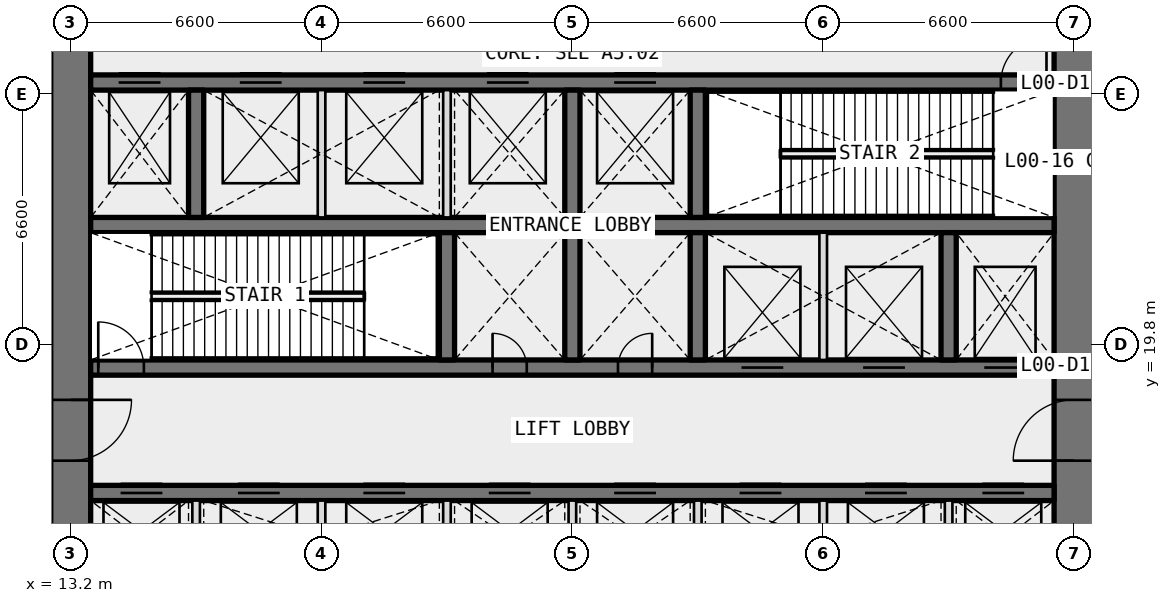
"""IFC4 building model, lengths in metres.
Left out: names, types, materials, properties, quantities, classifications, styles, units other than length and angle.
Written with IfcOpenShell. Run it as: python <this file> out.ifc"""

import sys

from ifc_helpers import new_model, si_unit, direction, frame, frame_2d, origin, place, context, subcontext, project, spatial, rectangle, extrude, element, fill, save


model = new_model("IFC4")
c1 = context("Model", 3, precision=1e-05, world=origin(), true_north=direction((0.0, 1.0)))
c2 = subcontext(c1, "Body", "Model", "MODEL_VIEW")
j1 = project(units=[si_unit("LENGTHUNIT", "METRE"), si_unit("PLANEANGLEUNIT", "RADIAN")], contexts=[c1])
p1 = place(None, origin())
s1 = spatial("IfcSite", under=j1, at=p1, CompositionType="ELEMENT")
p2 = place(p1, origin())
s2 = spatial("IfcBuilding", under=s1, at=p2, CompositionType="ELEMENT")
p3 = place(p2, origin())
s3 = spatial("IfcBuildingStorey", under=s2, at=p3, CompositionType="ELEMENT", Elevation=0.0)
p4 = place(p3, frame((39.6, 13.725, 0.0), z_axis=(0.0, 0.0, 1.0), x_axis=(0.0, 1.0, 0.0)))
e1 = element("IfcWall", 1, at=p4, inside=s3, PredefinedType="SHEAR", context=c2, shape_type="SweptSolid", body=[
    extrude(rectangle(XDim=18.75, YDim=1.05, at=frame_2d((9.375, 0.0))), origin(), (0.0, 0.0, 1.0), 7.2),
])
p5 = place(p4, frame((3.025, 0.0, 0.0)))
e2 = element("IfcOpeningElement", 2, at=p5, cuts=e1, PredefinedType="OPENING", context=c2, shape_type="SweptSolid", body=[
    extrude(rectangle(XDim=1.6, YDim=2.1, at=frame_2d((0.8, 1.05))), frame((0.0, 0.535, 0.0), z_axis=(0.0, -1.0, 0.0), x_axis=(1.0, 0.0, 0.0)), (0.0, 0.0, 1.0), 1.07),
])
p6 = place(p4, frame((13.825, 0.0, 0.0)))
e3 = element("IfcOpeningElement", 3, at=p6, cuts=e1, PredefinedType="OPENING", context=c2, shape_type="SweptSolid", body=[
    extrude(rectangle(XDim=1.6, YDim=2.1, at=frame_2d((0.8, 1.05))), frame((0.0, 0.535, 0.0), z_axis=(0.0, -1.0, 0.0), x_axis=(1.0, 0.0, 0.0)), (0.0, 0.0, 1.0), 1.07),
])
p7 = place(p3, frame((13.2, 32.475, 0.0), z_axis=(0.0, 0.0, 1.0), x_axis=(0.0, -1.0, 0.0)))
e4 = element("IfcWall", 4, at=p7, inside=s3, PredefinedType="SHEAR", context=c2, shape_type="SweptSolid", body=[
    extrude(rectangle(XDim=18.75, YDim=1.05, at=frame_2d((9.375, 0.0))), origin(), (0.0, 0.0, 1.0), 7.2),
])
p8 = place(p7, frame((14.125, 0.0, 0.0)))
e5 = element("IfcOpeningElement", 5, at=p8, cuts=e4, PredefinedType="OPENING", context=c2, shape_type="SweptSolid", body=[
    extrude(rectangle(XDim=1.6, YDim=2.1, at=frame_2d((0.8, 1.05))), frame((0.0, 0.535, 0.0), z_axis=(0.0, -1.0, 0.0), x_axis=(1.0, 0.0, 0.0)), (0.0, 0.0, 1.0), 1.07),
])
p9 = place(p7, frame((3.325, 0.0, 0.0)))
e6 = element("IfcOpeningElement", 6, at=p9, cuts=e4, PredefinedType="OPENING", context=c2, shape_type="SweptSolid", body=[
    extrude(rectangle(XDim=1.6, YDim=2.1, at=frame_2d((0.8, 1.05))), frame((0.0, 0.535, 0.0), z_axis=(0.0, -1.0, 0.0), x_axis=(1.0, 0.0, 0.0)), (0.0, 0.0, 1.0), 1.07),
])
p10 = place(p3, frame((13.725, 15.9, 0.0), z_axis=(0.0, 0.0, 1.0), x_axis=(1.0, 0.0, 0.0)))
e7 = element("IfcWall", 7, at=p10, inside=s3, PredefinedType="SHEAR", context=c2, shape_type="SweptSolid", body=[
    extrude(rectangle(XDim=25.35, YDim=0.4, at=frame_2d((12.675, 0.0))), origin(), (0.0, 0.0, 1.0), 7.2),
])
p11 = place(p10, frame((0.788, 0.0, 0.0)))
e8 = element("IfcOpeningElement", 8, at=p11, cuts=e7, PredefinedType="OPENING", context=c2, shape_type="SweptSolid", body=[
    extrude(rectangle(XDim=1.1, YDim=2.1, at=frame_2d((0.55, 1.05))), frame((0.0, 0.21, 0.0), z_axis=(0.0, -1.0, 0.0), x_axis=(1.0, 0.0, 0.0)), (0.0, 0.0, 1.0), 0.42),
])
p12 = place(p10, frame((3.875, 0.0, 0.0)))
e9 = element("IfcOpeningElement", 9, at=p12, cuts=e7, PredefinedType="OPENING", context=c2, shape_type="SweptSolid", body=[
    extrude(rectangle(XDim=1.1, YDim=2.1, at=frame_2d((0.55, 1.05))), frame((0.0, 0.21, 0.0), z_axis=(0.0, -1.0, 0.0), x_axis=(1.0, 0.0, 0.0)), (0.0, 0.0, 1.0), 0.42),
])
p13 = place(p10, frame((7.175, 0.0, 0.0)))
e10 = element("IfcOpeningElement", 10, at=p13, cuts=e7, PredefinedType="OPENING", context=c2, shape_type="SweptSolid", body=[
    extrude(rectangle(XDim=1.1, YDim=2.1, at=frame_2d((0.55, 1.05))), frame((0.0, 0.21, 0.0), z_axis=(0.0, -1.0, 0.0), x_axis=(1.0, 0.0, 0.0)), (0.0, 0.0, 1.0), 0.42),
])
p14 = place(p10, frame((10.475, 0.0, 0.0)))
e11 = element("IfcOpeningElement", 11, at=p14, cuts=e7, PredefinedType="OPENING", context=c2, shape_type="SweptSolid", body=[
    extrude(rectangle(XDim=1.1, YDim=2.1, at=frame_2d((0.55, 1.05))), frame((0.0, 0.21, 0.0), z_axis=(0.0, -1.0, 0.0), x_axis=(1.0, 0.0, 0.0)), (0.0, 0.0, 1.0), 0.42),
])
p15 = place(p10, frame((13.775, 0.0, 0.0)))
e12 = element("IfcOpeningElement", 12, at=p15, cuts=e7, PredefinedType="OPENING", context=c2, shape_type="SweptSolid", body=[
    extrude(rectangle(XDim=1.1, YDim=2.1, at=frame_2d((0.55, 1.05))), frame((0.0, 0.21, 0.0), z_axis=(0.0, -1.0, 0.0), x_axis=(1.0, 0.0, 0.0)), (0.0, 0.0, 1.0), 0.42),
])
p16 = place(p10, frame((17.075, 0.0, 0.0)))
e13 = element("IfcOpeningElement", 13, at=p16, cuts=e7, PredefinedType="OPENING", context=c2, shape_type="SweptSolid", body=[
    extrude(rectangle(XDim=1.1, YDim=2.1, at=frame_2d((0.55, 1.05))), frame((0.0, 0.21, 0.0), z_axis=(0.0, -1.0, 0.0), x_axis=(1.0, 0.0, 0.0)), (0.0, 0.0, 1.0), 0.42),
])
p17 = place(p10, frame((20.375, 0.0, 0.0)))
e14 = element("IfcOpeningElement", 14, at=p17, cuts=e7, PredefinedType="OPENING", context=c2, shape_type="SweptSolid", body=[
    extrude(rectangle(XDim=1.1, YDim=2.1, at=frame_2d((0.55, 1.05))), frame((0.0, 0.21, 0.0), z_axis=(0.0, -1.0, 0.0), x_axis=(1.0, 0.0, 0.0)), (0.0, 0.0, 1.0), 0.42),
])
p18 = place(p10, frame((23.462, 0.0, 0.0)))
e15 = element("IfcOpeningElement", 15, at=p18, cuts=e7, PredefinedType="OPENING", context=c2, shape_type="SweptSolid", body=[
    extrude(rectangle(XDim=1.1, YDim=2.1, at=frame_2d((0.55, 1.05))), frame((0.0, 0.21, 0.0), z_axis=(0.0, -1.0, 0.0), x_axis=(1.0, 0.0, 0.0)), (0.0, 0.0, 1.0), 0.42),
])
p19 = place(p3, frame((13.725, 19.2, 0.0), z_axis=(0.0, 0.0, 1.0), x_axis=(1.0, 0.0, 0.0)))
e16 = element("IfcWall", 16, at=p19, inside=s3, PredefinedType="SHEAR", context=c2, shape_type="SweptSolid", body=[
    extrude(rectangle(XDim=25.35, YDim=0.4, at=frame_2d((12.675, 0.0))), origin(), (0.0, 0.0, 1.0), 7.2),
])
p20 = place(p19, frame((10.575, 0.0, 0.0)))
e17 = element("IfcOpeningElement", 17, at=p20, cuts=e16, PredefinedType="OPENING", context=c2, shape_type="SweptSolid", body=[
    extrude(rectangle(XDim=0.9, YDim=2.1, at=frame_2d((0.45, 1.05))), frame((0.0, 0.21, 0.0), z_axis=(0.0, -1.0, 0.0), x_axis=(1.0, 0.0, 0.0)), (0.0, 0.0, 1.0), 0.42),
])
p21 = place(p19, frame((13.875, 0.0, 0.0)))
e18 = element("IfcOpeningElement", 18, at=p21, cuts=e16, PredefinedType="OPENING", context=c2, shape_type="SweptSolid", body=[
    extrude(rectangle(XDim=0.9, YDim=2.1, at=frame_2d((0.45, 1.05))), frame((0.0, 0.21, 0.0), z_axis=(0.0, -1.0, 0.0), x_axis=(1.0, 0.0, 0.0)), (0.0, 0.0, 1.0), 0.42),
])
p22 = place(p19, frame((0.2, 0.0, 0.0)))
e19 = element("IfcOpeningElement", 19, at=p22, cuts=e16, PredefinedType="OPENING", context=c2, shape_type="SweptSolid", body=[
    extrude(rectangle(XDim=1.2, YDim=2.1, at=frame_2d((0.6, 1.05))), frame((0.0, 0.21, 0.0), z_axis=(0.0, -1.0, 0.0), x_axis=(1.0, 0.0, 0.0)), (0.0, 0.0, 1.0), 0.42),
])
p23 = place(p19, frame((23.512, 0.0, 0.0)))
e20 = element("IfcOpeningElement", 20, at=p23, cuts=e16, PredefinedType="OPENING", context=c2, shape_type="SweptSolid", body=[
    extrude(rectangle(XDim=1.1, YDim=2.1, at=frame_2d((0.55, 1.05))), frame((0.0, 0.21, 0.0), z_axis=(0.0, -1.0, 0.0), x_axis=(1.0, 0.0, 0.0)), (0.0, 0.0, 1.0), 0.42),
])
p24 = place(p19, frame((17.125, 0.0, 0.0)))
e21 = element("IfcOpeningElement", 21, at=p24, cuts=e16, PredefinedType="OPENING", context=c2, shape_type="SweptSolid", body=[
    extrude(rectangle(XDim=1.1, YDim=2.1, at=frame_2d((0.55, 1.05))), frame((0.0, 0.21, 0.0), z_axis=(0.0, -1.0, 0.0), x_axis=(1.0, 0.0, 0.0)), (0.0, 0.0, 1.0), 0.42),
])
p25 = place(p19, frame((20.325, 0.0, 0.0)))
e22 = element("IfcOpeningElement", 22, at=p25, cuts=e16, PredefinedType="OPENING", context=c2, shape_type="SweptSolid", body=[
    extrude(rectangle(XDim=1.1, YDim=2.1, at=frame_2d((0.55, 1.05))), frame((0.0, 0.21, 0.0), z_axis=(0.0, -1.0, 0.0), x_axis=(1.0, 0.0, 0.0)), (0.0, 0.0, 1.0), 0.42),
])
p26 = place(p3, frame((13.725, 22.95, 0.0), z_axis=(0.0, 0.0, 1.0), x_axis=(1.0, 0.0, 0.0)))
e23 = element("IfcWall", 23, at=p26, inside=s3, PredefinedType="SHEAR", context=c2, shape_type="SweptSolid", body=[
    extrude(rectangle(XDim=25.35, YDim=0.4, at=frame_2d((12.675, 0.0))), origin(), (0.0, 0.0, 1.0), 7.2),
])
p27 = place(p3, frame((13.725, 26.7, 0.0), z_axis=(0.0, 0.0, 1.0), x_axis=(1.0, 0.0, 0.0)))
e24 = element("IfcWall", 24, at=p27, inside=s3, PredefinedType="SHEAR", context=c2, shape_type="SweptSolid", body=[
    extrude(rectangle(XDim=25.35, YDim=0.4, at=frame_2d((12.675, 0.0))), origin(), (0.0, 0.0, 1.0), 7.2),
])
p28 = place(p27, frame((23.95, 0.0, 0.0)))
e25 = element("IfcOpeningElement", 25, at=p28, cuts=e24, PredefinedType="OPENING", context=c2, shape_type="SweptSolid", body=[
    extrude(rectangle(XDim=1.2, YDim=2.1, at=frame_2d((0.6, 1.05))), frame((0.0, 0.21, 0.0), z_axis=(0.0, -1.0, 0.0), x_axis=(1.0, 0.0, 0.0)), (0.0, 0.0, 1.0), 0.42),
])
p29 = place(p27, frame((0.738, 0.0, 0.0)))
e26 = element("IfcOpeningElement", 26, at=p29, cuts=e24, PredefinedType="OPENING", context=c2, shape_type="SweptSolid", body=[
    extrude(rectangle(XDim=1.1, YDim=2.1, at=frame_2d((0.55, 1.05))), frame((0.0, 0.21, 0.0), z_axis=(0.0, -1.0, 0.0), x_axis=(1.0, 0.0, 0.0)), (0.0, 0.0, 1.0), 0.42),
])
p30 = place(p27, frame((3.925, 0.0, 0.0)))
e27 = element("IfcOpeningElement", 27, at=p30, cuts=e24, PredefinedType="OPENING", context=c2, shape_type="SweptSolid", body=[
    extrude(rectangle(XDim=1.1, YDim=2.1, at=frame_2d((0.55, 1.05))), frame((0.0, 0.21, 0.0), z_axis=(0.0, -1.0, 0.0), x_axis=(1.0, 0.0, 0.0)), (0.0, 0.0, 1.0), 0.42),
])
p31 = place(p27, frame((7.175, 0.0, 0.0)))
e28 = element("IfcOpeningElement", 28, at=p31, cuts=e24, PredefinedType="OPENING", context=c2, shape_type="SweptSolid", body=[
    extrude(rectangle(XDim=1.1, YDim=2.1, at=frame_2d((0.55, 1.05))), frame((0.0, 0.21, 0.0), z_axis=(0.0, -1.0, 0.0), x_axis=(1.0, 0.0, 0.0)), (0.0, 0.0, 1.0), 0.42),
])
p32 = place(p27, frame((10.425, 0.0, 0.0)))
e29 = element("IfcOpeningElement", 29, at=p32, cuts=e24, PredefinedType="OPENING", context=c2, shape_type="SweptSolid", body=[
    extrude(rectangle(XDim=1.1, YDim=2.1, at=frame_2d((0.55, 1.05))), frame((0.0, 0.21, 0.0), z_axis=(0.0, -1.0, 0.0), x_axis=(1.0, 0.0, 0.0)), (0.0, 0.0, 1.0), 0.42),
])
p33 = place(p27, frame((13.775, 0.0, 0.0)))
e30 = element("IfcOpeningElement", 30, at=p33, cuts=e24, PredefinedType="OPENING", context=c2, shape_type="SweptSolid", body=[
    extrude(rectangle(XDim=1.1, YDim=2.1, at=frame_2d((0.55, 1.05))), frame((0.0, 0.21, 0.0), z_axis=(0.0, -1.0, 0.0), x_axis=(1.0, 0.0, 0.0)), (0.0, 0.0, 1.0), 0.42),
])
for number, where, z_axis, x_axis in (
    (31, (23.1, 19.4, 0.0), (0.0, 0.0, 1.0), (0.0, 1.0, 0.0)),
    (32, (26.4, 19.4, 0.0), (0.0, 0.0, 1.0), (0.0, 1.0, 0.0)),
    (33, (29.7, 19.4, 0.0), (0.0, 0.0, 1.0), (0.0, 1.0, 0.0)),
    (34, (36.3, 19.4, 0.0), (0.0, 0.0, 1.0), (0.0, 1.0, 0.0)),
    (35, (16.5, 23.15, 0.0), (0.0, 0.0, 1.0), (0.0, 1.0, 0.0)),
    (36, (26.4, 23.15, 0.0), (0.0, 0.0, 1.0), (0.0, 1.0, 0.0)),
    (37, (29.7, 23.15, 0.0), (0.0, 0.0, 1.0), (0.0, 1.0, 0.0)),
):
    element("IfcWall", number, at=place(p3, frame(where, z_axis=z_axis, x_axis=x_axis)), inside=s3, PredefinedType="SHEAR", context=c2, shape_type="SweptSolid", body=[
        extrude(rectangle(XDim=3.35, YDim=0.4, at=frame_2d((1.675, 0.0))), origin(), (0.0, 0.0, 1.0), 7.2),
    ])
for number, where, z_axis, x_axis in (
    (38, (16.5, 13.725, 0.0), (0.0, 0.0, 1.0), (0.0, 1.0, 0.0)),
    (39, (19.8, 13.725, 0.0), (0.0, 0.0, 1.0), (0.0, 1.0, 0.0)),
    (40, (23.1, 13.725, 0.0), (0.0, 0.0, 1.0), (0.0, 1.0, 0.0)),
    (41, (26.4, 13.725, 0.0), (0.0, 0.0, 1.0), (0.0, 1.0, 0.0)),
    (42, (29.7, 13.725, 0.0), (0.0, 0.0, 1.0), (0.0, 1.0, 0.0)),
    (43, (33.0, 13.725, 0.0), (0.0, 0.0, 1.0), (0.0, 1.0, 0.0)),
    (44, (36.3, 13.725, 0.0), (0.0, 0.0, 1.0), (0.0, 1.0, 0.0)),
):
    element("IfcWall", number, at=place(p3, frame(where, z_axis=z_axis, x_axis=x_axis)), inside=s3, PredefinedType="PARTITIONING", context=c2, shape_type="SweptSolid", body=[
        extrude(rectangle(XDim=1.975, YDim=0.2, at=frame_2d((0.987, 0.0))), origin(), (0.0, 0.0, 1.0), 7.2),
    ])
for number, where, z_axis, x_axis in (
    (45, (33.0, 19.4, 0.0), (0.0, 0.0, 1.0), (0.0, 1.0, 0.0)),
    (46, (19.8, 23.15, 0.0), (0.0, 0.0, 1.0), (0.0, 1.0, 0.0)),
    (47, (23.1, 23.15, 0.0), (0.0, 0.0, 1.0), (0.0, 1.0, 0.0)),
):
    element("IfcWall", number, at=place(p3, frame(where, z_axis=z_axis, x_axis=x_axis)), inside=s3, PredefinedType="PARTITIONING", context=c2, shape_type="SweptSolid", body=[
        extrude(rectangle(XDim=3.35, YDim=0.2, at=frame_2d((1.675, 0.0))), origin(), (0.0, 0.0, 1.0), 7.2),
    ])
p34 = place(p20, origin())
e48 = element("IfcDoor", 48, at=p34, inside=s3, OperationType="SINGLE_SWING_LEFT", PredefinedType="DOOR", context=c2, shape_type="SweptSolid", body=[
    extrude(rectangle(XDim=0.9, YDim=2.1, at=frame_2d((0.45, 1.05))), frame((0.0, 0.025, 0.0), z_axis=(0.0, -1.0, 0.0), x_axis=(1.0, 0.0, 0.0)), (0.0, 0.0, 1.0), 0.05),
])
fill(e17, e48)
p35 = place(p21, origin())
e49 = element("IfcDoor", 49, at=p35, inside=s3, OperationType="SINGLE_SWING_RIGHT", PredefinedType="DOOR", context=c2, shape_type="SweptSolid", body=[
    extrude(rectangle(XDim=0.9, YDim=2.1, at=frame_2d((0.45, 1.05))), frame((0.0, 0.025, 0.0), z_axis=(0.0, -1.0, 0.0), x_axis=(1.0, 0.0, 0.0)), (0.0, 0.0, 1.0), 0.05),
])
fill(e18, e49)
p36 = place(p22, origin())
e50 = element("IfcDoor", 50, at=p36, inside=s3, OperationType="SINGLE_SWING_LEFT", PredefinedType="DOOR", context=c2, shape_type="SweptSolid", body=[
    extrude(rectangle(XDim=1.2, YDim=2.1, at=frame_2d((0.6, 1.05))), frame((0.0, 0.025, 0.0), z_axis=(0.0, -1.0, 0.0), x_axis=(1.0, 0.0, 0.0)), (0.0, 0.0, 1.0), 0.05),
])
fill(e19, e50)
p37 = place(p28, origin())
e51 = element("IfcDoor", 51, at=p37, inside=s3, OperationType="SINGLE_SWING_RIGHT", PredefinedType="DOOR", context=c2, shape_type="SweptSolid", body=[
    extrude(rectangle(XDim=1.2, YDim=2.1, at=frame_2d((0.6, 1.05))), frame((0.0, 0.025, 0.0), z_axis=(0.0, -1.0, 0.0), x_axis=(1.0, 0.0, 0.0)), (0.0, 0.0, 1.0), 0.05),
])
fill(e25, e51)
p38 = place(p8, origin())
e52 = element("IfcDoor", 52, at=p38, inside=s3, OperationType="DOUBLE_DOOR_DOUBLE_SWING", PredefinedType="DOOR", context=c2, shape_type="SweptSolid", body=[
    extrude(rectangle(XDim=1.6, YDim=2.1, at=frame_2d((0.8, 1.05))), frame((0.0, 0.025, 0.0), z_axis=(0.0, -1.0, 0.0), x_axis=(1.0, 0.0, 0.0)), (0.0, 0.0, 1.0), 0.05),
])
fill(e5, e52)
p39 = place(p5, origin())
e53 = element("IfcDoor", 53, at=p39, inside=s3, OperationType="DOUBLE_DOOR_DOUBLE_SWING", PredefinedType="DOOR", context=c2, shape_type="SweptSolid", body=[
    extrude(rectangle(XDim=1.6, YDim=2.1, at=frame_2d((0.8, 1.05))), frame((0.0, 0.025, 0.0), z_axis=(0.0, -1.0, 0.0), x_axis=(1.0, 0.0, 0.0)), (0.0, 0.0, 1.0), 0.05),
])
fill(e2, e53)
p40 = place(p11, origin())
e54 = element("IfcDoor", 54, at=p40, inside=s3, OperationType="DOUBLE_DOOR_SLIDING", PredefinedType="DOOR", context=c2, shape_type="SweptSolid", body=[
    extrude(rectangle(XDim=1.1, YDim=2.1, at=frame_2d((0.55, 1.05))), frame((0.0, 0.025, 0.0), z_axis=(0.0, -1.0, 0.0), x_axis=(1.0, 0.0, 0.0)), (0.0, 0.0, 1.0), 0.05),
])
fill(e8, e54)
p41 = place(p12, origin())
e55 = element("IfcDoor", 55, at=p41, inside=s3, OperationType="DOUBLE_DOOR_SLIDING", PredefinedType="DOOR", context=c2, shape_type="SweptSolid", body=[
    extrude(rectangle(XDim=1.1, YDim=2.1, at=frame_2d((0.55, 1.05))), frame((0.0, 0.025, 0.0), z_axis=(0.0, -1.0, 0.0), x_axis=(1.0, 0.0, 0.0)), (0.0, 0.0, 1.0), 0.05),
])
fill(e9, e55)
p42 = place(p13, origin())
e56 = element("IfcDoor", 56, at=p42, inside=s3, OperationType="DOUBLE_DOOR_SLIDING", PredefinedType="DOOR", context=c2, shape_type="SweptSolid", body=[
    extrude(rectangle(XDim=1.1, YDim=2.1, at=frame_2d((0.55, 1.05))), frame((0.0, 0.025, 0.0), z_axis=(0.0, -1.0, 0.0), x_axis=(1.0, 0.0, 0.0)), (0.0, 0.0, 1.0), 0.05),
])
fill(e10, e56)
p43 = place(p14, origin())
e57 = element("IfcDoor", 57, at=p43, inside=s3, OperationType="DOUBLE_DOOR_SLIDING", PredefinedType="DOOR", context=c2, shape_type="SweptSolid", body=[
    extrude(rectangle(XDim=1.1, YDim=2.1, at=frame_2d((0.55, 1.05))), frame((0.0, 0.025, 0.0), z_axis=(0.0, -1.0, 0.0), x_axis=(1.0, 0.0, 0.0)), (0.0, 0.0, 1.0), 0.05),
])
fill(e11, e57)
p44 = place(p15, origin())
e58 = element("IfcDoor", 58, at=p44, inside=s3, OperationType="DOUBLE_DOOR_SLIDING", PredefinedType="DOOR", context=c2, shape_type="SweptSolid", body=[
    extrude(rectangle(XDim=1.1, YDim=2.1, at=frame_2d((0.55, 1.05))), frame((0.0, 0.025, 0.0), z_axis=(0.0, -1.0, 0.0), x_axis=(1.0, 0.0, 0.0)), (0.0, 0.0, 1.0), 0.05),
])
fill(e12, e58)
p45 = place(p16, origin())
e59 = element("IfcDoor", 59, at=p45, inside=s3, OperationType="DOUBLE_DOOR_SLIDING", PredefinedType="DOOR", context=c2, shape_type="SweptSolid", body=[
    extrude(rectangle(XDim=1.1, YDim=2.1, at=frame_2d((0.55, 1.05))), frame((0.0, 0.025, 0.0), z_axis=(0.0, -1.0, 0.0), x_axis=(1.0, 0.0, 0.0)), (0.0, 0.0, 1.0), 0.05),
])
fill(e13, e59)
p46 = place(p17, origin())
e60 = element("IfcDoor", 60, at=p46, inside=s3, OperationType="DOUBLE_DOOR_SLIDING", PredefinedType="DOOR", context=c2, shape_type="SweptSolid", body=[
    extrude(rectangle(XDim=1.1, YDim=2.1, at=frame_2d((0.55, 1.05))), frame((0.0, 0.025, 0.0), z_axis=(0.0, -1.0, 0.0), x_axis=(1.0, 0.0, 0.0)), (0.0, 0.0, 1.0), 0.05),
])
fill(e14, e60)
p47 = place(p18, origin())
e61 = element("IfcDoor", 61, at=p47, inside=s3, OperationType="DOUBLE_DOOR_SLIDING", PredefinedType="DOOR", context=c2, shape_type="SweptSolid", body=[
    extrude(rectangle(XDim=1.1, YDim=2.1, at=frame_2d((0.55, 1.05))), frame((0.0, 0.025, 0.0), z_axis=(0.0, -1.0, 0.0), x_axis=(1.0, 0.0, 0.0)), (0.0, 0.0, 1.0), 0.05),
])
fill(e15, e61)
p48 = place(p29, origin())
e62 = element("IfcDoor", 62, at=p48, inside=s3, OperationType="DOUBLE_DOOR_SLIDING", PredefinedType="DOOR", context=c2, shape_type="SweptSolid", body=[
    extrude(rectangle(XDim=1.1, YDim=2.1, at=frame_2d((0.55, 1.05))), frame((0.0, 0.025, 0.0), z_axis=(0.0, -1.0, 0.0), x_axis=(1.0, 0.0, 0.0)), (0.0, 0.0, 1.0), 0.05),
])
fill(e26, e62)
p49 = place(p23, origin())
e63 = element("IfcDoor", 63, at=p49, inside=s3, OperationType="DOUBLE_DOOR_SLIDING", PredefinedType="DOOR", context=c2, shape_type="SweptSolid", body=[
    extrude(rectangle(XDim=1.1, YDim=2.1, at=frame_2d((0.55, 1.05))), frame((0.0, 0.025, 0.0), z_axis=(0.0, -1.0, 0.0), x_axis=(1.0, 0.0, 0.0)), (0.0, 0.0, 1.0), 0.05),
])
fill(e20, e63)
p50 = place(p24, origin())
e64 = element("IfcDoor", 64, at=p50, inside=s3, OperationType="DOUBLE_DOOR_SLIDING", PredefinedType="DOOR", context=c2, shape_type="SweptSolid", body=[
    extrude(rectangle(XDim=1.1, YDim=2.1, at=frame_2d((0.55, 1.05))), frame((0.0, 0.025, 0.0), z_axis=(0.0, -1.0, 0.0), x_axis=(1.0, 0.0, 0.0)), (0.0, 0.0, 1.0), 0.05),
])
fill(e21, e64)
p51 = place(p25, origin())
e65 = element("IfcDoor", 65, at=p51, inside=s3, OperationType="DOUBLE_DOOR_SLIDING", PredefinedType="DOOR", context=c2, shape_type="SweptSolid", body=[
    extrude(rectangle(XDim=1.1, YDim=2.1, at=frame_2d((0.55, 1.05))), frame((0.0, 0.025, 0.0), z_axis=(0.0, -1.0, 0.0), x_axis=(1.0, 0.0, 0.0)), (0.0, 0.0, 1.0), 0.05),
])
fill(e22, e65)
p52 = place(p30, origin())
e66 = element("IfcDoor", 66, at=p52, inside=s3, OperationType="DOUBLE_DOOR_SLIDING", PredefinedType="DOOR", context=c2, shape_type="SweptSolid", body=[
    extrude(rectangle(XDim=1.1, YDim=2.1, at=frame_2d((0.55, 1.05))), frame((0.0, 0.025, 0.0), z_axis=(0.0, -1.0, 0.0), x_axis=(1.0, 0.0, 0.0)), (0.0, 0.0, 1.0), 0.05),
])
fill(e27, e66)
p53 = place(p31, origin())
e67 = element("IfcDoor", 67, at=p53, inside=s3, OperationType="DOUBLE_DOOR_SLIDING", PredefinedType="DOOR", context=c2, shape_type="SweptSolid", body=[
    extrude(rectangle(XDim=1.1, YDim=2.1, at=frame_2d((0.55, 1.05))), frame((0.0, 0.025, 0.0), z_axis=(0.0, -1.0, 0.0), x_axis=(1.0, 0.0, 0.0)), (0.0, 0.0, 1.0), 0.05),
])
fill(e28, e67)
p54 = place(p32, origin())
e68 = element("IfcDoor", 68, at=p54, inside=s3, OperationType="DOUBLE_DOOR_SLIDING", PredefinedType="DOOR", context=c2, shape_type="SweptSolid", body=[
    extrude(rectangle(XDim=1.1, YDim=2.1, at=frame_2d((0.55, 1.05))), frame((0.0, 0.025, 0.0), z_axis=(0.0, -1.0, 0.0), x_axis=(1.0, 0.0, 0.0)), (0.0, 0.0, 1.0), 0.05),
])
fill(e29, e68)
p55 = place(p33, origin())
e69 = element("IfcDoor", 69, at=p55, inside=s3, OperationType="DOUBLE_DOOR_SLIDING", PredefinedType="DOOR", context=c2, shape_type="SweptSolid", body=[
    extrude(rectangle(XDim=1.1, YDim=2.1, at=frame_2d((0.55, 1.05))), frame((0.0, 0.025, 0.0), z_axis=(0.0, -1.0, 0.0), x_axis=(1.0, 0.0, 0.0)), (0.0, 0.0, 1.0), 0.05),
])
fill(e30, e69)
save(model, sys.argv[1])
